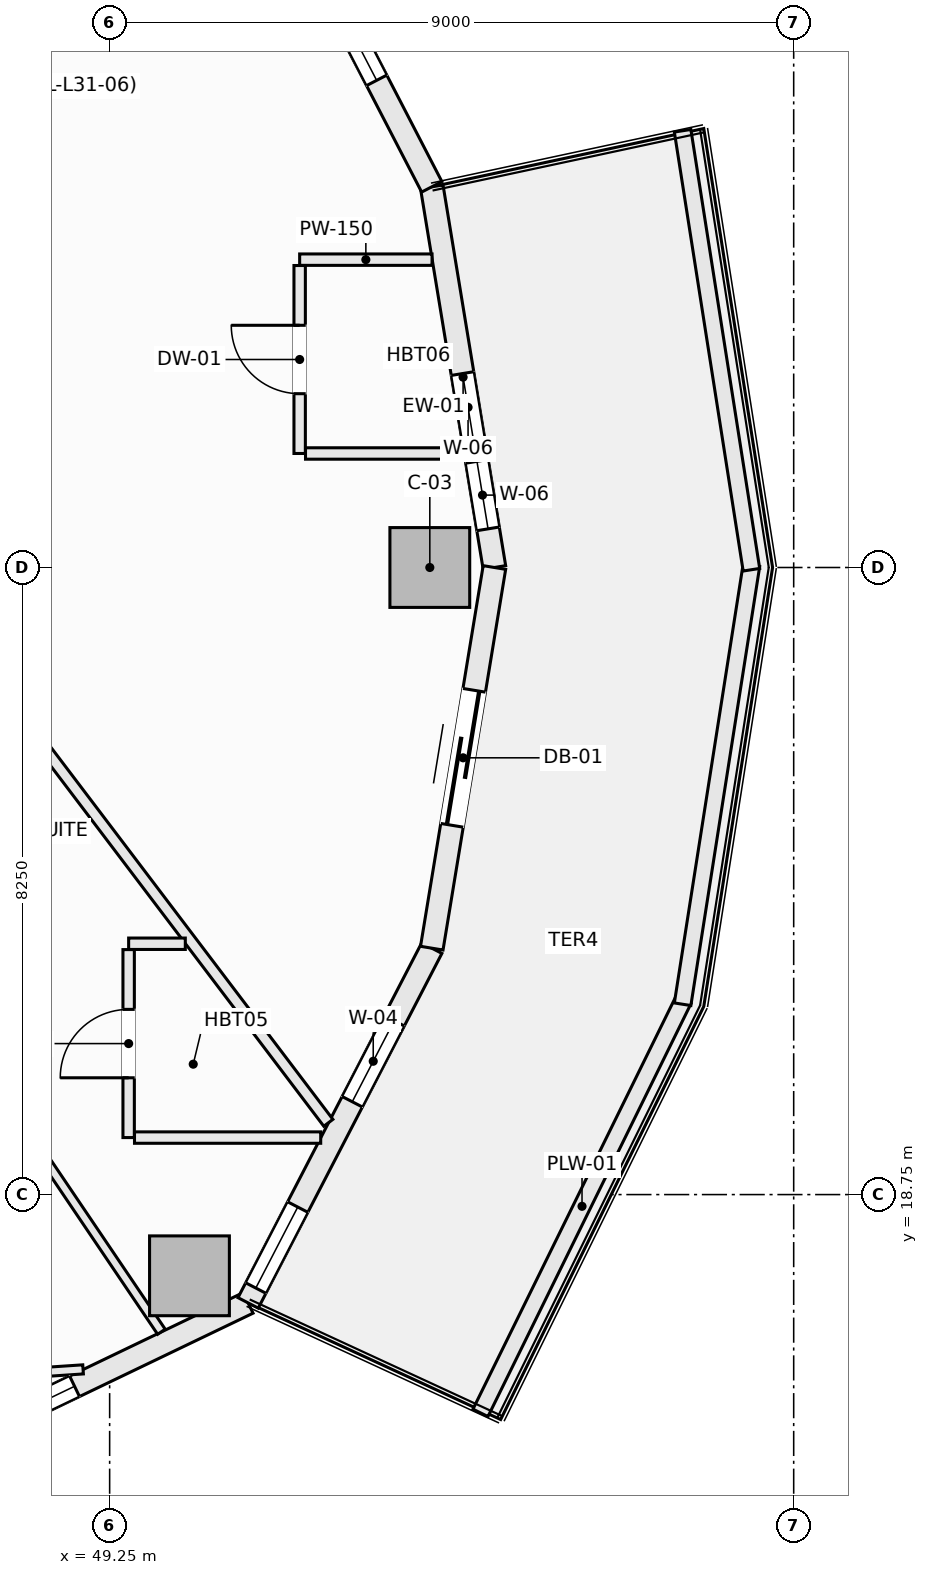
"""IFC4 building model, lengths in metres.
Left out: names, types, materials, properties, quantities, classifications, styles, units other than length and angle.
Written with IfcOpenShell. Run it as: python <this file> out.ifc"""

import sys

from ifc_helpers import new_model, si_unit, direction, frame, frame_2d, origin, origin_2d, place, context, subcontext, project, spatial, rectangle, extrude, element, fill, save


model = new_model("IFC4")
c1 = context("Model", 3, precision=1e-05, world=origin(), true_north=direction((0.0, 1.0)))
c2 = subcontext(c1, "Body", "Model", "MODEL_VIEW")
j1 = project(units=[si_unit("LENGTHUNIT", "METRE"), si_unit("PLANEANGLEUNIT", "RADIAN")], contexts=[c1])
p1 = place(None, origin())
s1 = spatial("IfcSite", under=j1, at=p1, CompositionType="ELEMENT")
p2 = place(p1, origin())
s2 = spatial("IfcBuilding", under=s1, at=p2, CompositionType="ELEMENT")
p3 = place(p2, frame((0.0, 0.0, 125.7)))
s3 = spatial("IfcBuildingStorey", under=s2, at=p3, CompositionType="ELEMENT", Elevation=125.7)
for number, where, z_axis, x_axis in (
    (1, (53.462, 27.0, -0.27), (0.0, 0.0, 1.0), (1.0, 0.0, 0.0)),
    (2, (50.3, 17.681, -0.27), (0.0, 0.0, 1.0), (1.0, 0.0, 0.0)),
):
    element("IfcColumn", number, at=place(p3, frame(where, z_axis=z_axis, x_axis=x_axis)), inside=s3, PredefinedType="COLUMN", context=c2, shape_type="SweptSolid", body=[
        extrude(rectangle(XDim=1.05, YDim=1.05, at=origin_2d()), origin(), (0.0, 0.0, 1.0), 3.4),
    ])
p4 = place(p3, frame((53.488, 32.008, 0.0), z_axis=(0.0, 0.0, 1.0), x_axis=(0.162393944769, -0.986726003864, 0.0)))
e3 = element("IfcWall", 3, at=p4, inside=s3, PredefinedType="SOLIDWALL", context=c2, shape_type="SweptSolid", body=[
    extrude(rectangle(XDim=5.075, YDim=0.3, at=frame_2d((2.538, 0.0))), origin(), (0.0, 0.0, 1.0), 2.653),
])
p5 = place(p4, frame((2.49, 0.0, 0.72)))
e4 = element("IfcOpeningElement", 4, at=p5, cuts=e3, PredefinedType="OPENING", context=c2, shape_type="SweptSolid", body=[
    extrude(rectangle(XDim=0.9, YDim=1.65, at=frame_2d((0.45, 0.825))), frame((0.0, 0.16, 0.0), z_axis=(0.0, -1.0, 0.0), x_axis=(1.0, 0.0, 0.0)), (0.0, 0.0, 1.0), 0.32),
])
p6 = place(p4, frame((3.66, 0.0, 0.72)))
e5 = element("IfcOpeningElement", 5, at=p6, cuts=e3, PredefinedType="OPENING", context=c2, shape_type="SweptSolid", body=[
    extrude(rectangle(XDim=0.9, YDim=1.65, at=frame_2d((0.45, 0.825))), frame((0.0, 0.16, 0.0), z_axis=(0.0, -1.0, 0.0), x_axis=(1.0, 0.0, 0.0)), (0.0, 0.0, 1.0), 0.32),
])
p7 = place(p3, frame((51.072, 36.675, 0.0), z_axis=(0.0, 0.0, 1.0), x_axis=(0.459767899643, -0.888039119892, 0.0)))
e6 = element("IfcWall", 6, at=p7, inside=s3, PredefinedType="SOLIDWALL", context=c2, shape_type="SweptSolid", body=[
    extrude(rectangle(XDim=5.255, YDim=0.3, at=frame_2d((2.628, 0.0))), origin(), (0.0, 0.0, 1.0), 2.653),
])
p8 = place(p7, frame((1.578, 0.0, 0.74)))
e7 = element("IfcOpeningElement", 7, at=p8, cuts=e6, PredefinedType="OPENING", context=c2, shape_type="SweptSolid", body=[
    extrude(rectangle(XDim=2.1, YDim=1.7, at=frame_2d((1.05, 0.85))), frame((0.0, 0.16, 0.0), z_axis=(0.0, -1.0, 0.0), x_axis=(1.0, 0.0, 0.0)), (0.0, 0.0, 1.0), 0.32),
])
p9 = place(p3, frame((45.769, 14.777, 0.0), z_axis=(0.0, 0.0, 1.0), x_axis=(0.901370184739, 0.433049408339, 0.0)))
e8 = element("IfcWall", 8, at=p9, inside=s3, PredefinedType="SOLIDWALL", context=c2, shape_type="SweptSolid", body=[
    extrude(rectangle(XDim=5.884, YDim=0.3, at=frame_2d((2.942, 0.0))), origin(), (0.0, 0.0, 1.0), 2.653),
])
p10 = place(p9, frame((1.25, 0.0, 0.74)))
e9 = element("IfcOpeningElement", 9, at=p10, cuts=e8, PredefinedType="OPENING", context=c2, shape_type="SweptSolid", body=[
    extrude(rectangle(XDim=2.1, YDim=1.7, at=frame_2d((1.05, 0.85))), frame((0.0, 0.16, 0.0), z_axis=(0.0, -1.0, 0.0), x_axis=(1.0, 0.0, 0.0)), (0.0, 0.0, 1.0), 0.32),
])
p11 = place(p3, frame((51.072, 17.325, 0.0), z_axis=(0.0, 0.0, 1.0), x_axis=(0.459767899643, 0.888039119892, 0.0)))
e10 = element("IfcWall", 10, at=p11, inside=s3, PredefinedType="SOLIDWALL", context=c2, shape_type="SweptSolid", body=[
    extrude(rectangle(XDim=5.255, YDim=0.3, at=frame_2d((2.628, 0.0))), origin(), (0.0, 0.0, 1.0), 2.653),
])
p12 = place(p11, frame((2.98, 0.0, 0.72)))
e11 = element("IfcOpeningElement", 11, at=p12, cuts=e10, PredefinedType="OPENING", context=c2, shape_type="SweptSolid", body=[
    extrude(rectangle(XDim=1.2, YDim=1.65, at=frame_2d((0.6, 0.825))), frame((0.0, 0.16, 0.0), z_axis=(0.0, -1.0, 0.0), x_axis=(1.0, 0.0, 0.0)), (0.0, 0.0, 1.0), 0.32),
])
p13 = place(p11, frame((0.22, 0.0, 0.72)))
e12 = element("IfcOpeningElement", 12, at=p13, cuts=e10, PredefinedType="OPENING", context=c2, shape_type="SweptSolid", body=[
    extrude(rectangle(XDim=1.2, YDim=1.65, at=frame_2d((0.6, 0.825))), frame((0.0, 0.16, 0.0), z_axis=(0.0, -1.0, 0.0), x_axis=(1.0, 0.0, 0.0)), (0.0, 0.0, 1.0), 0.32),
])
p14 = place(p3, frame((53.488, 21.992, 0.0), z_axis=(0.0, 0.0, 1.0), x_axis=(0.162393944769, 0.986726003864, 0.0)))
e13 = element("IfcWall", 13, at=p14, inside=s3, PredefinedType="SOLIDWALL", context=c2, shape_type="SweptSolid", body=[
    extrude(rectangle(XDim=5.075, YDim=0.3, at=frame_2d((2.538, 0.0))), origin(), (0.0, 0.0, 1.0), 2.653),
])
p15 = place(p14, frame((1.638, 0.0, 0.0)))
e14 = element("IfcOpeningElement", 14, at=p15, cuts=e13, PredefinedType="OPENING", context=c2, shape_type="SweptSolid", body=[
    extrude(rectangle(XDim=1.8, YDim=2.25, at=frame_2d((0.9, 1.125))), frame((0.0, 0.16, 0.0), z_axis=(0.0, -1.0, 0.0), x_axis=(1.0, 0.0, 0.0)), (0.0, 0.0, 1.0), 0.32),
])
p16 = place(p3, frame((54.129, 15.878, 0.0), z_axis=(0.0, 0.0, 1.0), x_axis=(0.441269631716, 0.897374566235, 0.0)))
e15 = element("IfcWall", 15, at=p16, inside=s3, PredefinedType="PARAPET", context=c2, shape_type="SweptSolid", body=[
    extrude(rectangle(XDim=6.056, YDim=0.22, at=frame_2d((3.028, 0.0))), origin(), (0.0, 0.0, 1.0), 0.52),
])
for number, where, z_axis, x_axis in (
    (16, (56.789, 21.254, 0.0), (0.0, 0.0, 1.0), (0.155, 0.988, 0.0)),
    (17, (56.789, 32.746, 0.0), (0.0, 0.0, 1.0), (0.155, -0.988, 0.0)),
):
    element("IfcWall", number, at=place(p3, frame(where, z_axis=z_axis, x_axis=x_axis)), inside=s3, PredefinedType="PARAPET", context=c2, shape_type="SweptSolid", body=[
        extrude(rectangle(XDim=5.846, YDim=0.22, at=frame_2d((2.923, 0.0))), origin(), (0.0, 0.0, 1.0), 0.52),
    ])
p17 = place(p3, frame((39.082, 15.792, 0.0), z_axis=(0.0, 0.0, 1.0), x_axis=(0.997763809534, 0.066838464862, 0.0)))
e18 = element("IfcWall", 18, at=p17, inside=s3, PredefinedType="PARTITIONING", context=c2, shape_type="SweptSolid", body=[
    extrude(rectangle(XDim=9.84, YDim=0.12, at=frame_2d((4.92, 0.0))), origin(), (0.0, 0.0, 1.0), 2.653),
])
p18 = place(p3, frame((38.862, 33.324, 0.0), z_axis=(0.0, 0.0, 1.0), x_axis=(0.55994174094, -0.828531982939, 0.0)))
e19 = element("IfcWall", 19, at=p18, inside=s3, PredefinedType="PARTITIONING", context=c2, shape_type="SweptSolid", body=[
    extrude(rectangle(XDim=19.768, YDim=0.12, at=frame_2d((9.884, 0.0))), origin(), (0.0, 0.0, 1.0), 2.505),
])
p19 = place(p3, frame((36.368, 40.488, 0.0), z_axis=(0.0, 0.0, 1.0), x_axis=(0.604016753865, -0.796971618723, 0.0)))
e20 = element("IfcWall", 20, at=p19, inside=s3, PredefinedType="PARTITIONING", context=c2, shape_type="SweptSolid", body=[
    extrude(rectangle(XDim=26.091, YDim=0.15, at=frame_2d((13.046, 0.0))), origin(), (0.0, 0.0, 1.0), 3.13),
])
p20 = place(p3, frame((49.5, 22.05, 0.0), z_axis=(0.0, 0.0, 1.0), x_axis=(1.0, 0.0, 0.0)))
e21 = element("IfcWall", 21, at=p20, inside=s3, PredefinedType="PARTITIONING", context=c2, shape_type="SweptSolid", body=[
    extrude(rectangle(XDim=0.745, YDim=0.15, at=frame_2d((0.373, 0.0))), origin(), (0.0, 0.0, 1.0), 3.13),
])
p21 = place(p3, frame((49.5, 19.5, 0.0), z_axis=(0.0, 0.0, 1.0), x_axis=(0.0, 1.0, 0.0)))
e22 = element("IfcWall", 22, at=p21, inside=s3, PredefinedType="PARTITIONING", context=c2, shape_type="SweptSolid", body=[
    extrude(rectangle(XDim=2.473, YDim=0.15, at=frame_2d((1.236, 0.0))), origin(), (0.0, 0.0, 1.0), 3.13),
])
p22 = place(p21, frame((0.787, 0.0, 0.0)))
e23 = element("IfcOpeningElement", 23, at=p22, cuts=e22, PredefinedType="OPENING", context=c2, shape_type="SweptSolid", body=[
    extrude(rectangle(XDim=0.9, YDim=2.1, at=frame_2d((0.45, 1.05))), frame((0.0, 0.085, 0.0), z_axis=(0.0, -1.0, 0.0), x_axis=(1.0, 0.0, 0.0)), (0.0, 0.0, 1.0), 0.17),
])
p23 = place(p3, frame((49.577, 19.5, 0.0), z_axis=(0.0, 0.0, 1.0), x_axis=(1.0, 0.0, 0.0)))
e24 = element("IfcWall", 24, at=p23, inside=s3, PredefinedType="PARTITIONING", context=c2, shape_type="SweptSolid", body=[
    extrude(rectangle(XDim=2.45, YDim=0.15, at=frame_2d((1.225, 0.0))), origin(), (0.0, 0.0, 1.0), 3.13),
])
p24 = place(p3, frame((51.75, 31.05, 0.0), z_axis=(0.0, 0.0, 1.0), x_axis=(1.0, 0.0, 0.0)))
e25 = element("IfcWall", 25, at=p24, inside=s3, PredefinedType="PARTITIONING", context=c2, shape_type="SweptSolid", body=[
    extrude(rectangle(XDim=1.742, YDim=0.15, at=frame_2d((0.871, 0.0))), origin(), (0.0, 0.0, 1.0), 3.13),
])
p25 = place(p3, frame((51.75, 28.5, 0.0), z_axis=(0.0, 0.0, 1.0), x_axis=(0.0, 1.0, 0.0)))
e26 = element("IfcWall", 26, at=p25, inside=s3, PredefinedType="PARTITIONING", context=c2, shape_type="SweptSolid", body=[
    extrude(rectangle(XDim=2.473, YDim=0.15, at=frame_2d((1.236, 0.0))), origin(), (0.0, 0.0, 1.0), 3.13),
])
p26 = place(p25, frame((0.787, 0.0, 0.0)))
e27 = element("IfcOpeningElement", 27, at=p26, cuts=e26, PredefinedType="OPENING", context=c2, shape_type="SweptSolid", body=[
    extrude(rectangle(XDim=0.9, YDim=2.1, at=frame_2d((0.45, 1.05))), frame((0.0, 0.085, 0.0), z_axis=(0.0, -1.0, 0.0), x_axis=(1.0, 0.0, 0.0)), (0.0, 0.0, 1.0), 0.17),
])
p27 = place(p3, frame((51.827, 28.5, 0.0), z_axis=(0.0, 0.0, 1.0), x_axis=(1.0, 0.0, 0.0)))
e28 = element("IfcWall", 28, at=p27, inside=s3, PredefinedType="PARTITIONING", context=c2, shape_type="SweptSolid", body=[
    extrude(rectangle(XDim=2.085, YDim=0.15, at=frame_2d((1.042, 0.0))), origin(), (0.0, 0.0, 1.0), 3.13),
])
p28 = place(p5, origin())
e29 = element("IfcWindow", 29, at=p28, inside=s3, PartitioningType="SINGLE_PANEL", PredefinedType="WINDOW", context=c2, shape_type="SweptSolid", body=[
    extrude(rectangle(XDim=0.9, YDim=1.65, at=frame_2d((0.45, 0.825))), frame((0.0, 0.03, 0.0), z_axis=(0.0, -1.0, 0.0), x_axis=(1.0, 0.0, 0.0)), (0.0, 0.0, 1.0), 0.06),
])
fill(e4, e29)
p29 = place(p8, origin())
e30 = element("IfcWindow", 30, at=p29, inside=s3, PartitioningType="SINGLE_PANEL", PredefinedType="WINDOW", context=c2, shape_type="SweptSolid", body=[
    extrude(rectangle(XDim=2.1, YDim=1.7, at=frame_2d((1.05, 0.85))), frame((0.0, 0.03, 0.0), z_axis=(0.0, -1.0, 0.0), x_axis=(1.0, 0.0, 0.0)), (0.0, 0.0, 1.0), 0.06),
])
fill(e7, e30)
p30 = place(p10, origin())
e31 = element("IfcWindow", 31, at=p30, inside=s3, PartitioningType="SINGLE_PANEL", PredefinedType="WINDOW", context=c2, shape_type="SweptSolid", body=[
    extrude(rectangle(XDim=2.1, YDim=1.7, at=frame_2d((1.05, 0.85))), frame((0.0, 0.03, 0.0), z_axis=(0.0, -1.0, 0.0), x_axis=(1.0, 0.0, 0.0)), (0.0, 0.0, 1.0), 0.06),
])
fill(e9, e31)
p31 = place(p12, origin())
e32 = element("IfcWindow", 32, at=p31, inside=s3, PartitioningType="SINGLE_PANEL", PredefinedType="WINDOW", context=c2, shape_type="SweptSolid", body=[
    extrude(rectangle(XDim=1.2, YDim=1.65, at=frame_2d((0.6, 0.825))), frame((0.0, 0.03, 0.0), z_axis=(0.0, -1.0, 0.0), x_axis=(1.0, 0.0, 0.0)), (0.0, 0.0, 1.0), 0.06),
])
fill(e11, e32)
p32 = place(p15, frame((1.8, 0.0, 0.0), z_axis=(0.0, 0.0, 1.0), x_axis=(-1.0, 0.0, 0.0)))
e33 = element("IfcDoor", 33, at=p32, inside=s3, OperationType="SLIDING_TO_LEFT", PredefinedType="DOOR", context=c2, shape_type="SweptSolid", body=[
    extrude(rectangle(XDim=1.8, YDim=2.25, at=frame_2d((0.9, 1.125))), frame((0.0, 0.025, 0.0), z_axis=(0.0, -1.0, 0.0), x_axis=(1.0, 0.0, 0.0)), (0.0, 0.0, 1.0), 0.05),
])
fill(e14, e33)
p33 = place(p22, origin())
e34 = element("IfcDoor", 34, at=p33, inside=s3, OperationType="SINGLE_SWING_LEFT", PredefinedType="DOOR", context=c2, shape_type="SweptSolid", body=[
    extrude(rectangle(XDim=0.9, YDim=2.1, at=frame_2d((0.45, 1.05))), frame((0.0, 0.025, 0.0), z_axis=(0.0, -1.0, 0.0), x_axis=(1.0, 0.0, 0.0)), (0.0, 0.0, 1.0), 0.05),
])
fill(e23, e34)
p34 = place(p26, origin())
e35 = element("IfcDoor", 35, at=p34, inside=s3, OperationType="SINGLE_SWING_RIGHT", PredefinedType="DOOR", context=c2, shape_type="SweptSolid", body=[
    extrude(rectangle(XDim=0.9, YDim=2.1, at=frame_2d((0.45, 1.05))), frame((0.0, 0.025, 0.0), z_axis=(0.0, -1.0, 0.0), x_axis=(1.0, 0.0, 0.0)), (0.0, 0.0, 1.0), 0.05),
])
fill(e27, e35)
p35 = place(p6, origin())
e36 = element("IfcWindow", 36, at=p35, inside=s3, PartitioningType="SINGLE_PANEL", PredefinedType="WINDOW", context=c2, shape_type="SweptSolid", body=[
    extrude(rectangle(XDim=0.9, YDim=1.65, at=frame_2d((0.45, 0.825))), frame((0.0, 0.03, 0.0), z_axis=(0.0, -1.0, 0.0), x_axis=(1.0, 0.0, 0.0)), (0.0, 0.0, 1.0), 0.06),
])
fill(e5, e36)
p36 = place(p13, origin())
e37 = element("IfcWindow", 37, at=p36, inside=s3, PartitioningType="SINGLE_PANEL", PredefinedType="WINDOW", context=c2, shape_type="SweptSolid", body=[
    extrude(rectangle(XDim=1.2, YDim=1.65, at=frame_2d((0.6, 0.825))), frame((0.0, 0.03, 0.0), z_axis=(0.0, -1.0, 0.0), x_axis=(1.0, 0.0, 0.0)), (0.0, 0.0, 1.0), 0.06),
])
fill(e12, e37)
save(model, sys.argv[1])
